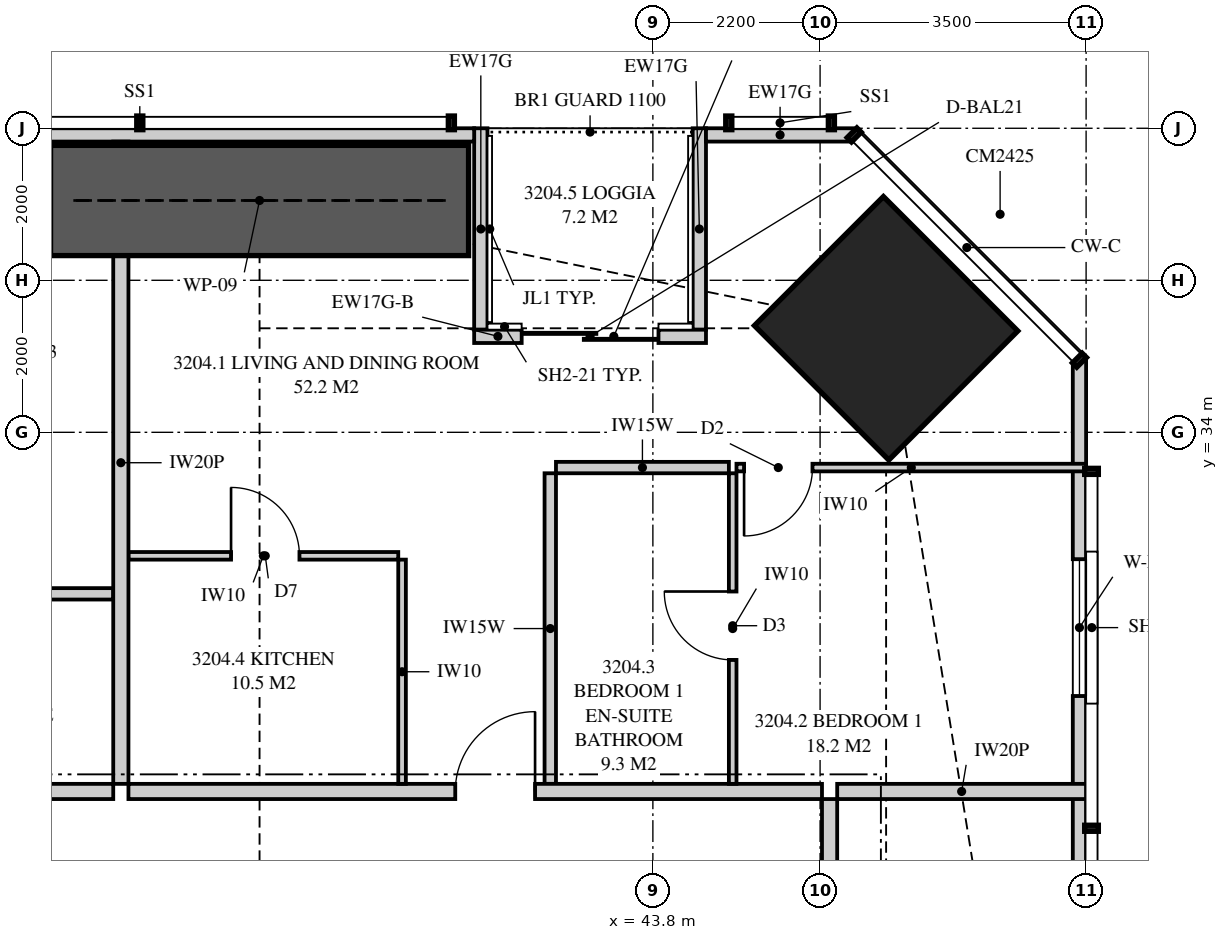
"""IFC4 building model, lengths in metres.
Left out: names, types, materials, properties, quantities, classifications, styles, units other than length and angle.
Written with IfcOpenShell. Run it as: python <this file> out.ifc"""

import sys

from ifc_helpers import new_model, si_unit, direction, frame, frame_2d, origin, origin_2d, place, context, subcontext, project, spatial, polyline, rectangle, outline, extrude, element, fill, save


model = new_model("IFC4")
c1 = context("Model", 3, precision=1e-05, world=origin(), true_north=direction((0.0, 1.0)))
c2 = subcontext(c1, "Body", "Model", "MODEL_VIEW")
j1 = project(units=[si_unit("LENGTHUNIT", "METRE"), si_unit("PLANEANGLEUNIT", "RADIAN")], contexts=[c1])
p1 = place(None, origin())
s1 = spatial("IfcSite", under=j1, at=p1, CompositionType="ELEMENT")
p2 = place(p1, origin())
s2 = spatial("IfcBuilding", under=s1, at=p2, CompositionType="ELEMENT")
p3 = place(p2, frame((0.0, 0.0, 118.25)))
s3 = spatial("IfcBuildingStorey", under=s2, at=p3, CompositionType="ELEMENT", Elevation=118.25)
p4 = place(p3, frame((46.869, 35.369, 0.0), z_axis=(0.0, 0.0, 1.0), x_axis=(-0.707106781187, -0.707106781187, 0.0)))
e1 = element("IfcColumn", 1, at=p4, inside=s3, PredefinedType="COLUMN", context=c2, shape_type="SweptSolid", body=[
    extrude(rectangle(XDim=2.4, YDim=2.5, at=origin_2d()), origin(), (0.0, 0.0, 1.0), 3.35),
])
p5 = place(p3, frame((49.413, 3.051, 0.0), z_axis=(0.0, 0.0, 1.0), x_axis=(0.0, 1.0, 0.0)))
e2 = element("IfcWall", 2, at=p5, inside=s3, PredefinedType="SOLIDWALL", context=c2, shape_type="SweptSolid", body=[
    extrude(outline(polyline([(0.0, 0.0), (31.897, 0.0), (31.897, 3.11), (22.167, 3.11), (22.167, 2.15), (22.074, 2.15), (22.074, 3.11), (21.949, 3.11), (21.949, 2.15), (9.949, 2.15), (9.949, 3.11), (9.823, 3.11), (9.823, 2.15), (9.73, 2.15), (9.73, 3.11), (0.0, 3.11), (0.0, 0.0)])), frame((0.0, 0.087, 0.0), z_axis=(0.0, -1.0, 0.0), x_axis=(1.0, 0.0, 0.0)), (0.0, 0.0, 1.0), 0.175),
])
p6 = place(p5, frame((2.118, 0.0, 0.4)))
e3 = element("IfcOpeningElement", 3, at=p6, cuts=e2, PredefinedType="OPENING", context=c2, shape_type="SweptSolid", body=[
    extrude(rectangle(XDim=1.8, YDim=1.7, at=frame_2d((0.9, 0.85))), frame((0.0, 0.097, 0.0), z_axis=(0.0, -1.0, 0.0), x_axis=(1.0, 0.0, 0.0)), (0.0, 0.0, 1.0), 0.195),
])
p7 = place(p5, frame((14.849, 0.0, 0.4)))
e4 = element("IfcOpeningElement", 4, at=p7, cuts=e2, PredefinedType="OPENING", context=c2, shape_type="SweptSolid", body=[
    extrude(rectangle(XDim=1.2, YDim=1.7, at=frame_2d((0.6, 0.85))), frame((0.0, 0.097, 0.0), z_axis=(0.0, -1.0, 0.0), x_axis=(1.0, 0.0, 0.0)), (0.0, 0.0, 1.0), 0.195),
])
p8 = place(p5, frame((27.479, 0.0, 0.4)))
e5 = element("IfcOpeningElement", 5, at=p8, cuts=e2, PredefinedType="OPENING", context=c2, shape_type="SweptSolid", body=[
    extrude(rectangle(XDim=1.8, YDim=1.7, at=frame_2d((0.9, 0.85))), frame((0.0, 0.097, 0.0), z_axis=(0.0, -1.0, 0.0), x_axis=(1.0, 0.0, 0.0)), (0.0, 0.0, 1.0), 0.195),
])
p9 = place(p3, frame((46.449, 37.913, 0.0), z_axis=(0.0, 0.0, 1.0), x_axis=(-1.0, 0.0, 0.0)))
e6 = element("IfcWall", 6, at=p9, inside=s3, PredefinedType="SOLIDWALL", context=c2, shape_type="SweptSolid", body=[
    extrude(rectangle(XDim=1.95, YDim=0.175, at=frame_2d((0.975, 0.0))), origin(), (0.0, 0.0, 1.0), 3.11),
])
p10 = place(p3, frame((41.449, 37.913, 0.0), z_axis=(0.0, 0.0, 1.0), x_axis=(-1.0, 0.0, 0.0)))
e7 = element("IfcWall", 7, at=p10, inside=s3, PredefinedType="SOLIDWALL", context=c2, shape_type="SweptSolid", body=[
    extrude(outline(polyline([(0.0, 0.0), (27.374, 0.0), (27.374, 3.11), (24.777, 3.11), (24.777, 2.15), (24.732, 2.15), (24.732, 3.11), (24.574, 3.11), (24.574, 2.15), (2.824, 2.15), (2.824, 3.11), (2.666, 3.11), (2.666, 2.15), (2.62, 2.15), (2.62, 3.11), (0.0, 3.11), (0.0, 0.0)])), frame((0.0, 0.087, 0.0), z_axis=(0.0, -1.0, 0.0), x_axis=(1.0, 0.0, 0.0)), (0.0, 0.0, 1.0), 0.175),
])
p11 = place(p10, frame((5.699, 0.0, 0.4)))
e8 = element("IfcOpeningElement", 8, at=p11, cuts=e7, PredefinedType="OPENING", context=c2, shape_type="SweptSolid", body=[
    extrude(rectangle(XDim=1.8, YDim=1.7, at=frame_2d((0.9, 0.85))), frame((0.0, 0.097, 0.0), z_axis=(0.0, -1.0, 0.0), x_axis=(1.0, 0.0, 0.0)), (0.0, 0.0, 1.0), 0.195),
])
p12 = place(p10, frame((9.034, 0.0, 0.4)))
e9 = element("IfcOpeningElement", 9, at=p12, cuts=e7, PredefinedType="OPENING", context=c2, shape_type="SweptSolid", body=[
    extrude(rectangle(XDim=1.8, YDim=1.7, at=frame_2d((0.9, 0.85))), frame((0.0, 0.097, 0.0), z_axis=(0.0, -1.0, 0.0), x_axis=(1.0, 0.0, 0.0)), (0.0, 0.0, 1.0), 0.195),
])
p13 = place(p10, frame((16.558, 0.0, 0.4)))
e10 = element("IfcOpeningElement", 10, at=p13, cuts=e7, PredefinedType="OPENING", context=c2, shape_type="SweptSolid", body=[
    extrude(rectangle(XDim=1.8, YDim=1.7, at=frame_2d((0.9, 0.85))), frame((0.0, 0.097, 0.0), z_axis=(0.0, -1.0, 0.0), x_axis=(1.0, 0.0, 0.0)), (0.0, 0.0, 1.0), 0.195),
])
p14 = place(p10, frame((19.724, 0.0, 0.4)))
e11 = element("IfcOpeningElement", 11, at=p14, cuts=e7, PredefinedType="OPENING", context=c2, shape_type="SweptSolid", body=[
    extrude(rectangle(XDim=1.8, YDim=1.7, at=frame_2d((0.9, 0.85))), frame((0.0, 0.097, 0.0), z_axis=(0.0, -1.0, 0.0), x_axis=(1.0, 0.0, 0.0)), (0.0, 0.0, 1.0), 0.195),
])
p15 = place(p3, frame((44.499, 35.262, 0.0), z_axis=(0.0, 0.0, 1.0), x_axis=(-1.0, 0.0, 0.0)))
e12 = element("IfcWall", 12, at=p15, inside=s3, PredefinedType="SOLIDWALL", context=c2, shape_type="SweptSolid", body=[
    extrude(rectangle(XDim=2.425, YDim=0.175, at=frame_2d((1.212, 0.0))), origin(), (0.0, 0.0, 1.0), 2.15),
])
p16 = place(p15, frame((0.625, 0.0, 0.0)))
e13 = element("IfcOpeningElement", 13, at=p16, cuts=e12, PredefinedType="OPENING", context=c2, shape_type="SweptSolid", body=[
    extrude(rectangle(XDim=1.8, YDim=2.1, at=frame_2d((0.9, 1.05))), frame((0.0, 0.097, 0.0), z_axis=(0.0, -1.0, 0.0), x_axis=(1.0, 0.0, 0.0)), (0.0, 0.0, 1.0), 0.195),
])
p17 = place(p3, frame((42.074, 35.262, 0.0), z_axis=(0.0, 0.0, 1.0), x_axis=(-1.0, 0.0, 0.0)))
e14 = element("IfcWall", 14, at=p17, inside=s3, PredefinedType="SOLIDWALL", context=c2, shape_type="SweptSolid", body=[
    extrude(rectangle(XDim=0.625, YDim=0.175, at=frame_2d((0.312, 0.0))), origin(), (0.0, 0.0, 1.0), 2.51),
])
p18 = place(p3, frame((44.411, 38.0, 0.0), z_axis=(0.0, 0.0, 1.0), x_axis=(0.0, -1.0, 0.0)))
e15 = element("IfcWall", 15, at=p18, inside=s3, PredefinedType="SOLIDWALL", context=c2, shape_type="SweptSolid", body=[
    extrude(outline(polyline([(0.0, 0.0), (2.65, 0.0), (2.65, 2.15), (1.296, 2.15), (1.296, 3.11), (0.0, 3.11), (0.0, 0.0)])), frame((0.0, 0.087, 0.0), z_axis=(0.0, -1.0, 0.0), x_axis=(1.0, 0.0, 0.0)), (0.0, 0.0, 1.0), 0.175),
])
p19 = place(p3, frame((41.536, 38.0, 0.0), z_axis=(0.0, 0.0, 1.0), x_axis=(0.0, -1.0, 0.0)))
e16 = element("IfcWall", 16, at=p19, inside=s3, PredefinedType="SOLIDWALL", context=c2, shape_type="SweptSolid", body=[
    extrude(outline(polyline([(0.0, 0.0), (2.65, 0.0), (2.65, 2.51), (2.378, 2.51), (2.378, 2.15), (0.709, 2.15), (0.709, 3.11), (0.0, 3.11), (0.0, 0.0)])), frame((0.0, 0.087, 0.0), z_axis=(0.0, -1.0, 0.0), x_axis=(1.0, 0.0, 0.0)), (0.0, 0.0, 1.0), 0.175),
])
p20 = place(p3, frame((36.8, 37.825, 0.0), z_axis=(0.0, 0.0, 1.0), x_axis=(0.0, -1.0, 0.0)))
e17 = element("IfcWall", 17, at=p20, inside=s3, PredefinedType="PARTITIONING", context=c2, shape_type="SweptSolid", body=[
    extrude(outline(polyline([(0.529, 2.15), (0.0, 2.15), (0.0, 0.0), (0.529, 0.0), (0.529, 0.256), (1.021, 0.256), (1.021, 0.0), (8.45, 0.0), (8.45, 3.11), (1.685, 3.11), (1.685, 2.15), (1.021, 2.15), (1.021, 1.894), (0.529, 1.894), (0.529, 2.15)])), frame((0.0, 0.1, 0.0), z_axis=(0.0, -1.0, 0.0), x_axis=(1.0, 0.0, 0.0)), (0.0, 0.0, 1.0), 0.2),
])
p21 = place(p3, frame((17.775, 29.275, 0.0), z_axis=(0.0, 0.0, 1.0), x_axis=(1.0, 0.0, 0.0)))
e18 = element("IfcWall", 18, at=p21, inside=s3, PredefinedType="PARTITIONING", context=c2, shape_type="SweptSolid", body=[
    extrude(outline(polyline([(0.0, 0.0), (18.925, 0.0), (18.925, 3.11), (10.312, 3.11), (10.312, 2.541), (9.638, 2.541), (9.638, 3.11), (0.0, 3.11), (0.0, 0.0)])), frame((0.0, 0.1, 0.0), z_axis=(0.0, -1.0, 0.0), x_axis=(1.0, 0.0, 0.0)), (0.0, 0.0, 1.0), 0.2),
])
p22 = place(p21, frame((3.125, 0.0, 0.0)))
e19 = element("IfcOpeningElement", 19, at=p22, cuts=e18, PredefinedType="OPENING", context=c2, shape_type="SweptSolid", body=[
    extrude(rectangle(XDim=1.05, YDim=2.2, at=frame_2d((0.525, 1.1))), frame((0.0, 0.11, 0.0), z_axis=(0.0, -1.0, 0.0), x_axis=(1.0, 0.0, 0.0)), (0.0, 0.0, 1.0), 0.22),
])
p23 = place(p3, frame((32.95, 31.875, 0.0), z_axis=(0.0, 0.0, 1.0), x_axis=(1.0, 0.0, 0.0)))
e20 = element("IfcWall", 20, at=p23, inside=s3, PredefinedType="PLUMBINGWALL", context=c2, shape_type="SweptSolid", body=[
    extrude(rectangle(XDim=3.75, YDim=0.15, at=frame_2d((1.875, 0.0))), origin(), (0.0, 0.0, 1.0), 3.11),
])
p24 = place(p23, frame((0.4, 0.0, 0.0)))
e21 = element("IfcOpeningElement", 21, at=p24, cuts=e20, PredefinedType="OPENING", context=c2, shape_type="SweptSolid", body=[
    extrude(rectangle(XDim=0.9, YDim=2.1, at=frame_2d((0.45, 1.05))), frame((0.0, 0.085, 0.0), z_axis=(0.0, -1.0, 0.0), x_axis=(1.0, 0.0, 0.0)), (0.0, 0.0, 1.0), 0.17),
])
p25 = place(p3, frame((36.9, 29.275, 0.0), z_axis=(0.0, 0.0, 1.0), x_axis=(1.0, 0.0, 0.0)))
e22 = element("IfcWall", 22, at=p25, inside=s3, PredefinedType="PARTITIONING", context=c2, shape_type="SweptSolid", body=[
    extrude(outline(polyline([(0.0, 0.0), (9.125, 0.0), (9.125, 3.11), (2.062, 3.11), (2.062, 2.541), (1.388, 2.541), (1.388, 3.11), (0.0, 3.11), (0.0, 0.0)])), frame((0.0, 0.1, 0.0), z_axis=(0.0, -1.0, 0.0), x_axis=(1.0, 0.0, 0.0)), (0.0, 0.0, 1.0), 0.2),
])
p26 = place(p25, frame((4.3, 0.0, 0.0)))
e23 = element("IfcOpeningElement", 23, at=p26, cuts=e22, PredefinedType="OPENING", context=c2, shape_type="SweptSolid", body=[
    extrude(rectangle(XDim=1.05, YDim=2.2, at=frame_2d((0.525, 1.1))), frame((0.0, 0.11, 0.0), z_axis=(0.0, -1.0, 0.0), x_axis=(1.0, 0.0, 0.0)), (0.0, 0.0, 1.0), 0.22),
])
p27 = place(p3, frame((44.85, 33.461, 0.0), z_axis=(0.0, 0.0, 1.0), x_axis=(0.0, -1.0, 0.0)))
e24 = element("IfcWall", 24, at=p27, inside=s3, PredefinedType="PARTITIONING", context=c2, shape_type="SweptSolid", body=[
    extrude(rectangle(XDim=4.086, YDim=0.1, at=frame_2d((2.043, 0.0))), origin(), (0.0, 0.0, 1.0), 3.11),
])
p28 = place(p27, frame((1.556, 0.0, 0.0)))
e25 = element("IfcOpeningElement", 25, at=p28, cuts=e24, PredefinedType="OPENING", context=c2, shape_type="SweptSolid", body=[
    extrude(rectangle(XDim=0.9, YDim=2.1, at=frame_2d((0.45, 1.05))), frame((0.0, 0.06, 0.0), z_axis=(0.0, -1.0, 0.0), x_axis=(1.0, 0.0, 0.0)), (0.0, 0.0, 1.0), 0.12),
])
p29 = place(p3, frame((44.9, 33.536, 0.0), z_axis=(0.0, 0.0, 1.0), x_axis=(1.0, 0.0, 0.0)))
e26 = element("IfcWall", 26, at=p29, inside=s3, PredefinedType="PARTITIONING", context=c2, shape_type="SweptSolid", body=[
    extrude(outline(polyline([(0.0, 0.0), (4.6, 0.0), (4.6, 3.11), (3.137, 3.11), (3.137, 2.15), (1.395, 2.15), (1.395, 3.11), (0.0, 3.11), (0.0, 0.0)])), frame((0.0, 0.05, 0.0), z_axis=(0.0, -1.0, 0.0), x_axis=(1.0, 0.0, 0.0)), (0.0, 0.0, 1.0), 0.1),
])
p30 = place(p29, frame((0.1, 0.0, 0.0)))
e27 = element("IfcOpeningElement", 27, at=p30, cuts=e26, PredefinedType="OPENING", context=c2, shape_type="SweptSolid", body=[
    extrude(rectangle(XDim=0.9, YDim=2.1, at=frame_2d((0.45, 1.05))), frame((0.0, 0.06, 0.0), z_axis=(0.0, -1.0, 0.0), x_axis=(1.0, 0.0, 0.0)), (0.0, 0.0, 1.0), 0.12),
])
p31 = place(p3, frame((42.525, 33.536, 0.0), z_axis=(0.0, 0.0, 1.0), x_axis=(1.0, 0.0, 0.0)))
e28 = element("IfcWall", 28, at=p31, inside=s3, PredefinedType="PLUMBINGWALL", context=c2, shape_type="SweptSolid", body=[
    extrude(rectangle(XDim=2.275, YDim=0.15, at=frame_2d((1.138, 0.0))), origin(), (0.0, 0.0, 1.0), 3.11),
])
p32 = place(p3, frame((42.45, 33.461, 0.0), z_axis=(0.0, 0.0, 1.0), x_axis=(0.0, -1.0, 0.0)))
e29 = element("IfcWall", 29, at=p32, inside=s3, PredefinedType="PLUMBINGWALL", context=c2, shape_type="SweptSolid", body=[
    extrude(rectangle(XDim=4.086, YDim=0.15, at=frame_2d((2.043, 0.0))), origin(), (0.0, 0.0, 1.0), 3.11),
])
p33 = place(p3, frame((36.9, 32.375, 0.0), z_axis=(0.0, 0.0, 1.0), x_axis=(1.0, 0.0, 0.0)))
e30 = element("IfcWall", 30, at=p33, inside=s3, PredefinedType="PARTITIONING", context=c2, shape_type="SweptSolid", body=[
    extrude(outline(polyline([(0.0, 0.0), (3.55, 0.0), (3.55, 3.11), (2.012, 3.11), (2.012, 2.541), (1.438, 2.541), (1.438, 3.11), (0.0, 3.11), (0.0, 0.0)])), frame((0.0, 0.05, 0.0), z_axis=(0.0, -1.0, 0.0), x_axis=(1.0, 0.0, 0.0)), (0.0, 0.0, 1.0), 0.1),
])
p34 = place(p33, frame((1.35, 0.0, 0.0)))
e31 = element("IfcOpeningElement", 31, at=p34, cuts=e30, PredefinedType="OPENING", context=c2, shape_type="SweptSolid", body=[
    extrude(rectangle(XDim=0.9, YDim=2.1, at=frame_2d((0.45, 1.05))), frame((0.0, 0.06, 0.0), z_axis=(0.0, -1.0, 0.0), x_axis=(1.0, 0.0, 0.0)), (0.0, 0.0, 1.0), 0.12),
])
p35 = place(p3, frame((40.5, 32.325, 0.0), z_axis=(0.0, 0.0, 1.0), x_axis=(0.0, -1.0, 0.0)))
e32 = element("IfcWall", 32, at=p35, inside=s3, PredefinedType="PARTITIONING", context=c2, shape_type="SweptSolid", body=[
    extrude(rectangle(XDim=2.95, YDim=0.1, at=frame_2d((1.475, 0.0))), origin(), (0.0, 0.0, 1.0), 3.11),
])
p36 = place(p3, frame((46.225, 29.275, 0.0), z_axis=(0.0, 0.0, 1.0), x_axis=(1.0, 0.0, 0.0)))
e33 = element("IfcWall", 33, at=p36, inside=s3, PredefinedType="PARTITIONING", context=c2, shape_type="SweptSolid", body=[
    extrude(outline(polyline([(0.0, 0.0), (3.275, 0.0), (3.275, 3.11), (2.554, 3.11), (2.554, 2.15), (0.805, 2.15), (0.805, 2.541), (0.306, 2.541), (0.306, 3.11), (0.0, 3.11), (0.0, 0.0)])), frame((0.0, 0.1, 0.0), z_axis=(0.0, -1.0, 0.0), x_axis=(1.0, 0.0, 0.0)), (0.0, 0.0, 1.0), 0.2),
])
p37 = place(p3, frame((46.125, 20.7, 0.0), z_axis=(0.0, 0.0, 1.0), x_axis=(0.0, 1.0, 0.0)))
e34 = element("IfcWall", 34, at=p37, inside=s3, PredefinedType="PARTITIONING", context=c2, shape_type="SweptSolid", body=[
    extrude(outline(polyline([(0.0, 0.0), (8.475, 0.0), (8.475, 3.11), (4.637, 3.11), (4.637, 2.541), (3.963, 2.541), (3.963, 3.11), (0.0, 3.11), (0.0, 0.0)])), frame((0.0, 0.1, 0.0), z_axis=(0.0, -1.0, 0.0), x_axis=(1.0, 0.0, 0.0)), (0.0, 0.0, 1.0), 0.2),
])
p38 = place(p37, frame((6.625, 0.0, 0.0)))
e35 = element("IfcOpeningElement", 35, at=p38, cuts=e34, PredefinedType="OPENING", context=c2, shape_type="SweptSolid", body=[
    extrude(rectangle(XDim=1.0, YDim=2.1, at=frame_2d((0.5, 1.05))), frame((0.0, 0.11, 0.0), z_axis=(0.0, -1.0, 0.0), x_axis=(1.0, 0.0, 0.0)), (0.0, 0.0, 1.0), 0.22),
])
p39 = place(p3, frame((35.875, 37.05, 0.0), z_axis=(0.0, 0.0, 1.0), x_axis=(1.0, 0.0, 0.0)))
e36 = element("IfcWall", 36, at=p39, inside=s3, PredefinedType="SHEAR", context=c2, shape_type="SweptSolid", body=[
    extrude(rectangle(XDim=5.5, YDim=1.45, at=frame_2d((2.75, 0.0))), origin(), (0.0, 0.0, 1.0), 3.35),
])
p40 = place(p8, origin())
e37 = element("IfcWindow", 37, at=p40, inside=s3, PartitioningType="SINGLE_PANEL", PredefinedType="WINDOW", context=c2, shape_type="SweptSolid", body=[
    extrude(rectangle(XDim=1.8, YDim=1.7, at=frame_2d((0.9, 0.85))), frame((0.0, 0.03, 0.0), z_axis=(0.0, -1.0, 0.0), x_axis=(1.0, 0.0, 0.0)), (0.0, 0.0, 1.0), 0.06),
])
fill(e5, e37)
p41 = place(p16, origin())
e38 = element("IfcDoor", 38, at=p41, inside=s3, OperationType="SLIDING_TO_LEFT", PredefinedType="DOOR", context=c2, shape_type="SweptSolid", body=[
    extrude(rectangle(XDim=1.8, YDim=2.1, at=frame_2d((0.9, 1.05))), frame((0.0, 0.025, 0.0), z_axis=(0.0, -1.0, 0.0), x_axis=(1.0, 0.0, 0.0)), (0.0, 0.0, 1.0), 0.05),
])
fill(e13, e38)
p42 = place(p26, origin())
e39 = element("IfcDoor", 39, at=p42, inside=s3, OperationType="SINGLE_SWING_RIGHT", PredefinedType="DOOR", context=c2, shape_type="SweptSolid", body=[
    extrude(rectangle(XDim=1.05, YDim=2.2, at=frame_2d((0.525, 1.1))), frame((0.0, 0.025, 0.0), z_axis=(0.0, -1.0, 0.0), x_axis=(1.0, 0.0, 0.0)), (0.0, 0.0, 1.0), 0.05),
])
fill(e23, e39)
p43 = place(p30, frame((0.9, 0.0, 0.0), z_axis=(0.0, 0.0, 1.0), x_axis=(-1.0, 0.0, 0.0)))
e40 = element("IfcDoor", 40, at=p43, inside=s3, OperationType="SINGLE_SWING_RIGHT", PredefinedType="DOOR", context=c2, shape_type="SweptSolid", body=[
    extrude(rectangle(XDim=0.9, YDim=2.1, at=frame_2d((0.45, 1.05))), frame((0.0, 0.025, 0.0), z_axis=(0.0, -1.0, 0.0), x_axis=(1.0, 0.0, 0.0)), (0.0, 0.0, 1.0), 0.05),
])
fill(e27, e40)
p44 = place(p28, frame((0.9, 0.0, 0.0), z_axis=(0.0, 0.0, 1.0), x_axis=(-1.0, 0.0, 0.0)))
e41 = element("IfcDoor", 41, at=p44, inside=s3, OperationType="SINGLE_SWING_RIGHT", PredefinedType="DOOR", context=c2, shape_type="SweptSolid", body=[
    extrude(rectangle(XDim=0.9, YDim=2.1, at=frame_2d((0.45, 1.05))), frame((0.0, 0.025, 0.0), z_axis=(0.0, -1.0, 0.0), x_axis=(1.0, 0.0, 0.0)), (0.0, 0.0, 1.0), 0.05),
])
fill(e25, e41)
p45 = place(p34, origin())
e42 = element("IfcDoor", 42, at=p45, inside=s3, OperationType="SINGLE_SWING_LEFT", PredefinedType="DOOR", context=c2, shape_type="SweptSolid", body=[
    extrude(rectangle(XDim=0.9, YDim=2.1, at=frame_2d((0.45, 1.05))), frame((0.0, 0.025, 0.0), z_axis=(0.0, -1.0, 0.0), x_axis=(1.0, 0.0, 0.0)), (0.0, 0.0, 1.0), 0.05),
])
fill(e31, e42)
save(model, sys.argv[1])
